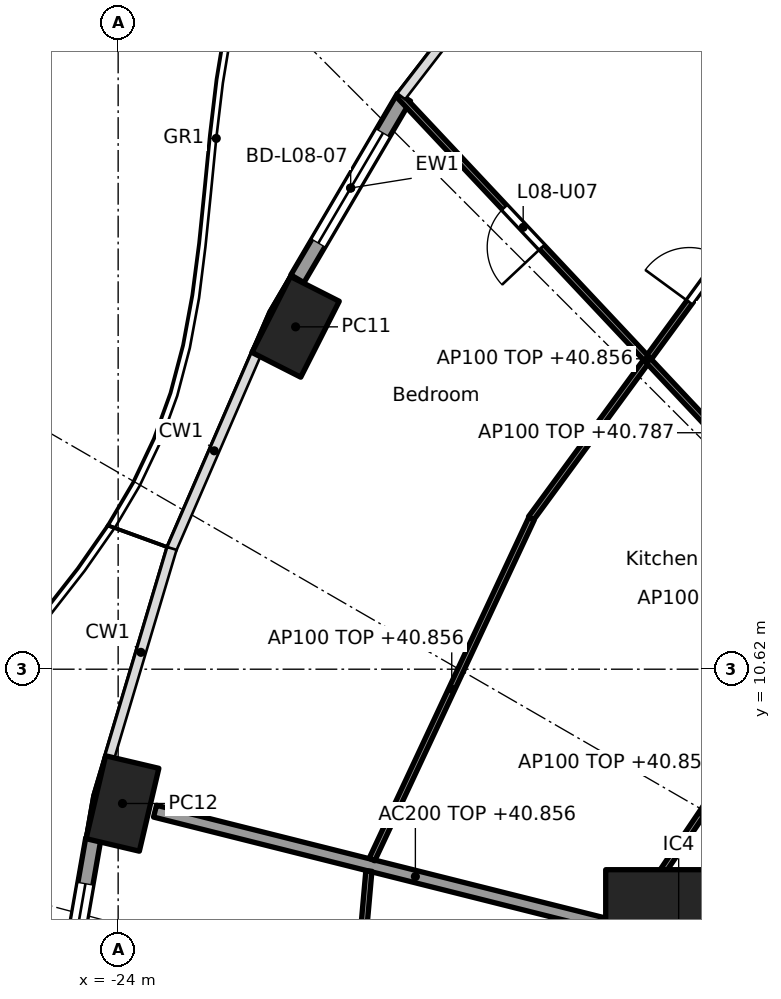
"""IFC4 building model, lengths in metres.
Left out: names, types, materials, properties, quantities, classifications, styles, units other than length and angle.
Written with IfcOpenShell. Run it as: python <this file> out.ifc"""

import sys

from ifc_helpers import new_model, si_unit, direction, frame, frame_2d, origin, origin_2d, place, context, subcontext, project, spatial, rectangle, hollow_rectangle, extrude, element, fill, save


model = new_model("IFC4")
c1 = context("Model", 3, precision=1e-05, world=origin(), true_north=direction((0.0, 1.0)))
c2 = subcontext(c1, "Body", "Model", "MODEL_VIEW")
j1 = project(units=[si_unit("LENGTHUNIT", "METRE"), si_unit("PLANEANGLEUNIT", "RADIAN")], contexts=[c1])
p1 = place(None, origin())
s1 = spatial("IfcSite", under=j1, at=p1, CompositionType="ELEMENT")
p2 = place(p1, origin())
s2 = spatial("IfcBuilding", under=s1, at=p2, CompositionType="ELEMENT")
p3 = place(p2, frame((0.0, 0.0, 38.1)))
s3 = spatial("IfcBuildingStorey", under=s2, at=p3, CompositionType="ELEMENT", Elevation=38.1)
for number, where, z_axis, x_axis in (
    (1, (-21.082, 16.25, 0.0), (0.0, 0.0, 1.0), (-0.452, -0.892, 0.0)),
    (2, (-23.929, 8.412, 0.0), (0.0, 0.0, 1.0), (-0.229, -0.973, 0.0)),
):
    element("IfcColumn", number, at=place(p3, frame(where, z_axis=z_axis, x_axis=x_axis)), inside=s3, PredefinedType="COLUMN", context=c2, shape_type="SweptSolid", body=[
        extrude(hollow_rectangle(XDim=1.4, YDim=0.9, WallThickness=0.05, at=origin_2d()), origin(), (0.0, 0.0, 1.0), 3.7),
    ])
p4 = place(p3, frame((-14.782, 6.123, 0.0), z_axis=(0.0, 0.0, 1.0), x_axis=(1.0, 0.0, 0.0)))
e3 = element("IfcColumn", 3, at=p4, inside=s3, PredefinedType="COLUMN", context=c2, shape_type="SweptSolid", body=[
    extrude(rectangle(XDim=2.4, YDim=2.4, at=origin_2d()), origin(), (0.0, 0.0, 1.0), 3.7),
])
p5 = place(p3, frame((-21.052, 17.04, 0.0), z_axis=(0.0, 0.0, 1.0), x_axis=(0.506311160839, 0.862350861546, 0.0)))
e4 = element("IfcWall", 4, at=p5, inside=s3, PredefinedType="SOLIDWALL", context=c2, shape_type="SweptSolid", body=[
    extrude(rectangle(XDim=3.462, YDim=0.25, at=frame_2d((1.731, 0.0))), origin(), (0.0, 0.0, 1.0), 3.44),
])
p6 = place(p5, frame((0.681, 0.0, 0.0)))
e5 = element("IfcOpeningElement", 5, at=p6, cuts=e4, PredefinedType="OPENING", context=c2, shape_type="SweptSolid", body=[
    extrude(rectangle(XDim=2.1, YDim=2.4, at=frame_2d((1.05, 1.2))), frame((0.0, 0.135, 0.0), z_axis=(0.0, -1.0, 0.0), x_axis=(1.0, 0.0, 0.0)), (0.0, 0.0, 1.0), 0.27),
])
p7 = place(p3, frame((-25.029, 4.286, 0.0), z_axis=(0.0, 0.0, 1.0), x_axis=(0.172217377323, 0.98505897029, 0.0)))
e6 = element("IfcWall", 6, at=p7, inside=s3, PredefinedType="SOLIDWALL", context=c2, shape_type="SweptSolid", body=[
    extrude(rectangle(XDim=3.598, YDim=0.25, at=frame_2d((1.799, 0.0))), origin(), (0.0, 0.0, 1.0), 3.44),
])
p8 = place(p7, frame((0.749, 0.0, 0.0)))
e7 = element("IfcOpeningElement", 7, at=p8, cuts=e6, PredefinedType="OPENING", context=c2, shape_type="SweptSolid", body=[
    extrude(rectangle(XDim=2.1, YDim=2.4, at=frame_2d((1.05, 1.2))), frame((0.0, 0.135, 0.0), z_axis=(0.0, -1.0, 0.0), x_axis=(1.0, 0.0, 0.0)), (0.0, 0.0, 1.0), 0.27),
])
p9 = place(p3, frame((-14.831, 6.135, 0.0), z_axis=(0.0, 0.0, 1.0), x_axis=(-0.969884949569, 0.243563512454, 0.0)))
e8 = element("IfcWall", 8, at=p9, inside=s3, PredefinedType="PARTITIONING", context=c2, shape_type="SweptSolid", body=[
    extrude(rectangle(XDim=8.829, YDim=0.2, at=frame_2d((4.415, 0.0))), origin(), (0.0, 0.0, 1.0), 2.756),
])
p10 = place(p3, frame((-13.362, 18.35, 0.0), z_axis=(0.0, 0.0, 1.0), x_axis=(-0.591191311491, -0.806531359104, 0.0)))
e9 = element("IfcWall", 9, at=p10, inside=s3, PredefinedType="PARTITIONING", context=c2, shape_type="SweptSolid", body=[
    extrude(rectangle(XDim=6.51, YDim=0.1, at=frame_2d((3.255, 0.0))), origin(), (0.0, 0.0, 1.0), 2.756),
])
p11 = place(p10, frame((1.202, 0.0, 0.0)))
e10 = element("IfcOpeningElement", 10, at=p11, cuts=e9, PredefinedType="OPENING", context=c2, shape_type="SweptSolid", body=[
    extrude(rectangle(XDim=0.9, YDim=2.1, at=frame_2d((0.45, 1.05))), frame((0.0, 0.06, 0.0), z_axis=(0.0, -1.0, 0.0), x_axis=(1.0, 0.0, 0.0)), (0.0, 0.0, 1.0), 0.12),
])
p12 = place(p3, frame((-8.953, 8.958, 0.0), z_axis=(0.0, 0.0, 1.0), x_axis=(-0.684574307023, 0.728943082939, 0.0)))
e11 = element("IfcWall", 11, at=p12, inside=s3, PredefinedType="PARTITIONING", context=c2, shape_type="SweptSolid", body=[
    extrude(rectangle(XDim=15.231, YDim=0.1, at=frame_2d((7.615, 0.0))), origin(), (0.0, 0.0, 1.0), 2.687),
])
p13 = place(p12, frame((1.54, 0.0, 0.0)))
e12 = element("IfcOpeningElement", 12, at=p13, cuts=e11, PredefinedType="OPENING", context=c2, shape_type="SweptSolid", body=[
    extrude(rectangle(XDim=0.9, YDim=2.1, at=frame_2d((0.45, 1.05))), frame((0.0, 0.06, 0.0), z_axis=(0.0, -1.0, 0.0), x_axis=(1.0, 0.0, 0.0)), (0.0, 0.0, 1.0), 0.12),
])
p14 = place(p12, frame((6.174, 0.0, 0.0)))
e13 = element("IfcOpeningElement", 13, at=p14, cuts=e11, PredefinedType="OPENING", context=c2, shape_type="SweptSolid", body=[
    extrude(rectangle(XDim=0.9, YDim=2.1, at=frame_2d((0.45, 1.05))), frame((0.0, 0.06, 0.0), z_axis=(0.0, -1.0, 0.0), x_axis=(1.0, 0.0, 0.0)), (0.0, 0.0, 1.0), 0.12),
])
p15 = place(p12, frame((11.8, 0.0, 0.0)))
e14 = element("IfcOpeningElement", 14, at=p15, cuts=e11, PredefinedType="OPENING", context=c2, shape_type="SweptSolid", body=[
    extrude(rectangle(XDim=0.9, YDim=2.1, at=frame_2d((0.45, 1.05))), frame((0.0, 0.06, 0.0), z_axis=(0.0, -1.0, 0.0), x_axis=(1.0, 0.0, 0.0)), (0.0, 0.0, 1.0), 0.12),
])
p16 = place(p3, frame((-13.162, 10.087, 0.0), z_axis=(0.0, 0.0, 1.0), x_axis=(-0.55912750241, -0.829081682375, 0.0)))
e15 = element("IfcWall", 15, at=p16, inside=s3, PredefinedType="PARTITIONING", context=c2, shape_type="SweptSolid", body=[
    extrude(rectangle(XDim=4.408, YDim=0.1, at=frame_2d((2.204, 0.0))), origin(), (0.0, 0.0, 1.0), 2.756),
])
p17 = place(p3, frame((-17.203, 13.095, 0.0), z_axis=(0.0, 0.0, 1.0), x_axis=(-0.423926333401, -0.905696673202, 0.0)))
e16 = element("IfcWall", 16, at=p17, inside=s3, PredefinedType="PARTITIONING", context=c2, shape_type="SweptSolid", body=[
    extrude(rectangle(XDim=6.188, YDim=0.1, at=frame_2d((3.094, 0.0))), origin(), (0.0, 0.0, 1.0), 2.756),
])
p18 = place(p3, frame((-19.877, 7.301, 0.0), z_axis=(0.0, 0.0, 1.0), x_axis=(-0.088143415068, -0.996107794558, 0.0)))
e17 = element("IfcWall", 17, at=p18, inside=s3, PredefinedType="PARTITIONING", context=c2, shape_type="SweptSolid", body=[
    extrude(rectangle(XDim=7.279, YDim=0.1, at=frame_2d((3.64, 0.0))), origin(), (0.0, 0.0, 1.0), 2.756),
])
p19 = place(p6, origin())
e18 = element("IfcDoor", 18, at=p19, inside=s3, OperationType="SLIDING_TO_LEFT", PredefinedType="DOOR", context=c2, shape_type="SweptSolid", body=[
    extrude(rectangle(XDim=2.1, YDim=2.4, at=frame_2d((1.05, 1.2))), frame((0.0, 0.025, 0.0), z_axis=(0.0, -1.0, 0.0), x_axis=(1.0, 0.0, 0.0)), (0.0, 0.0, 1.0), 0.05),
])
fill(e5, e18)
p20 = place(p8, origin())
e19 = element("IfcDoor", 19, at=p20, inside=s3, OperationType="SLIDING_TO_LEFT", PredefinedType="DOOR", context=c2, shape_type="SweptSolid", body=[
    extrude(rectangle(XDim=2.1, YDim=2.4, at=frame_2d((1.05, 1.2))), frame((0.0, 0.025, 0.0), z_axis=(0.0, -1.0, 0.0), x_axis=(1.0, 0.0, 0.0)), (0.0, 0.0, 1.0), 0.05),
])
fill(e7, e19)
p21 = place(p11, frame((0.9, 0.0, 0.0), x_axis=(-1.0, 0.0, 0.0)))
e20 = element("IfcDoor", 20, at=p21, inside=s3, OperationType="SINGLE_SWING_LEFT", PredefinedType="DOOR", context=c2, shape_type="SweptSolid", body=[
    extrude(rectangle(XDim=0.9, YDim=2.1, at=frame_2d((0.45, 1.05))), frame((0.0, 0.025, 0.0), z_axis=(0.0, -1.0, 0.0), x_axis=(1.0, 0.0, 0.0)), (0.0, 0.0, 1.0), 0.05),
])
fill(e10, e20)
p22 = place(p15, origin())
e21 = element("IfcDoor", 21, at=p22, inside=s3, OperationType="SINGLE_SWING_LEFT", PredefinedType="DOOR", context=c2, shape_type="SweptSolid", body=[
    extrude(rectangle(XDim=0.9, YDim=2.1, at=frame_2d((0.45, 1.05))), frame((0.0, 0.025, 0.0), z_axis=(0.0, -1.0, 0.0), x_axis=(1.0, 0.0, 0.0)), (0.0, 0.0, 1.0), 0.05),
])
fill(e14, e21)
save(model, sys.argv[1])
